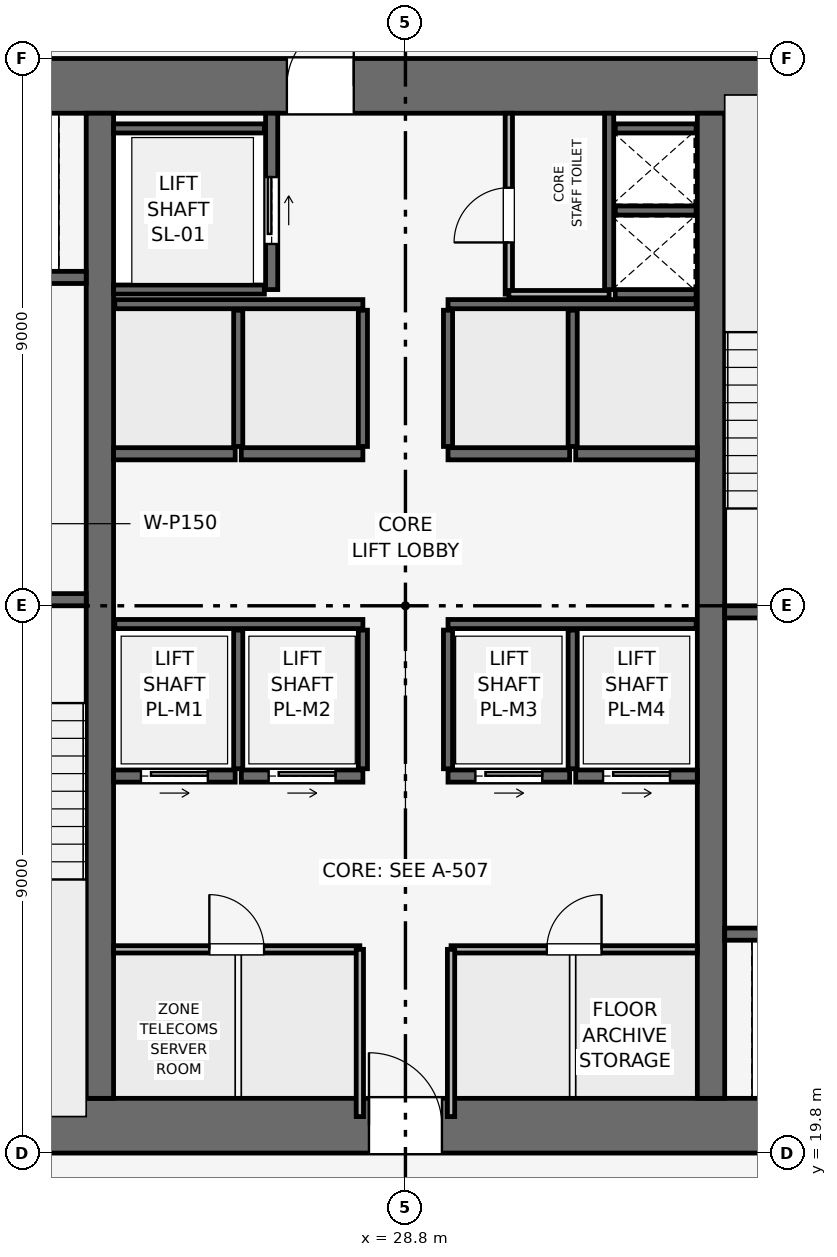
"""IFC4 building model, lengths in metres.
Left out: names, types, materials, properties, quantities, classifications, styles, units other than length and angle.
Written with IfcOpenShell. Run it as: python <this file> out.ifc"""

import sys

from ifc_helpers import new_model, si_unit, direction, frame, frame_2d, origin, place, context, subcontext, project, spatial, rectangle, extrude, element, fill, save


model = new_model("IFC4")
c1 = context("Model", 3, precision=1e-05, world=origin(), true_north=direction((0.0, 1.0)))
c2 = subcontext(c1, "Body", "Model", "MODEL_VIEW")
j1 = project(units=[si_unit("LENGTHUNIT", "METRE"), si_unit("PLANEANGLEUNIT", "RADIAN")], contexts=[c1])
p1 = place(None, origin())
s1 = spatial("IfcSite", under=j1, at=p1, CompositionType="ELEMENT")
p2 = place(p1, origin())
s2 = spatial("IfcBuilding", under=s1, at=p2, CompositionType="ELEMENT")
p3 = place(p2, frame((0.0, 0.0, 160.8)))
s3 = spatial("IfcBuildingStorey", under=s2, at=p3, CompositionType="ELEMENT", Elevation=160.8)
p4 = place(p3, frame((19.8, 20.25, 0.0), z_axis=(0.0, 0.0, 1.0), x_axis=(1.0, 0.0, 0.0)))
e1 = element("IfcWall", 1, at=p4, inside=s3, PredefinedType="SHEAR", context=c2, shape_type="SweptSolid", body=[
    extrude(rectangle(XDim=18.0, YDim=0.9, at=frame_2d((9.0, 0.0))), origin(), (0.0, 0.0, 1.0), 3.75),
])
p5 = place(p4, frame((8.4, 0.0, 0.0)))
e2 = element("IfcOpeningElement", 2, at=p5, cuts=e1, PredefinedType="OPENING", context=c2, shape_type="SweptSolid", body=[
    extrude(rectangle(XDim=1.2, YDim=2.2, at=frame_2d((0.6, 1.1))), frame((0.0, 0.46, 0.0), z_axis=(0.0, -1.0, 0.0), x_axis=(1.0, 0.0, 0.0)), (0.0, 0.0, 1.0), 0.92),
])
p6 = place(p3, frame((19.8, 37.35, 0.0), z_axis=(0.0, 0.0, 1.0), x_axis=(1.0, 0.0, 0.0)))
e3 = element("IfcWall", 3, at=p6, inside=s3, PredefinedType="SHEAR", context=c2, shape_type="SweptSolid", body=[
    extrude(rectangle(XDim=18.0, YDim=0.9, at=frame_2d((9.0, 0.0))), origin(), (0.0, 0.0, 1.0), 3.75),
])
p7 = place(p6, frame((7.05, 0.0, 0.0)))
e4 = element("IfcOpeningElement", 4, at=p7, cuts=e3, PredefinedType="OPENING", context=c2, shape_type="SweptSolid", body=[
    extrude(rectangle(XDim=1.1, YDim=2.15, at=frame_2d((0.55, 1.075))), frame((0.0, 0.46, 0.0), z_axis=(0.0, -1.0, 0.0), x_axis=(1.0, 0.0, 0.0)), (0.0, 0.0, 1.0), 0.92),
])
for number, where, z_axis, x_axis in (
    (5, (23.775, 20.7, 0.0), (0.0, 0.0, 1.0), (0.0, 1.0, 0.0)),
    (6, (33.825, 20.7, 0.0), (0.0, 0.0, 1.0), (0.0, 1.0, 0.0)),
):
    element("IfcWall", number, at=place(p3, frame(where, z_axis=z_axis, x_axis=x_axis)), inside=s3, PredefinedType="SHEAR", context=c2, shape_type="SweptSolid", body=[
        extrude(rectangle(XDim=16.2, YDim=0.45, at=frame_2d((8.1, 0.0))), origin(), (0.0, 0.0, 1.0), 3.75),
    ])
p8 = place(p3, frame((20.4, 28.9, 0.0), z_axis=(0.0, 0.0, 1.0), x_axis=(1.0, 0.0, 0.0)))
e7 = element("IfcWall", 7, at=p8, inside=s3, PredefinedType="SHEAR", context=c2, shape_type="SweptSolid", body=[
    extrude(rectangle(XDim=3.15, YDim=0.2, at=frame_2d((1.575, 0.0))), origin(), (0.0, 0.0, 1.0), 3.495),
])
p9 = place(p8, frame((0.8, 0.0, 0.0)))
e8 = element("IfcOpeningElement", 8, at=p9, cuts=e7, PredefinedType="OPENING", context=c2, shape_type="SweptSolid", body=[
    extrude(rectangle(XDim=1.0, YDim=2.1, at=frame_2d((0.5, 1.05))), frame((0.0, 0.11, 0.0), z_axis=(0.0, -1.0, 0.0), x_axis=(1.0, 0.0, 0.0)), (0.0, 0.0, 1.0), 0.22),
])
p10 = place(p3, frame((34.05, 28.7, 0.0), z_axis=(0.0, 0.0, 1.0), x_axis=(1.0, 0.0, 0.0)))
e9 = element("IfcWall", 9, at=p10, inside=s3, PredefinedType="SHEAR", context=c2, shape_type="SweptSolid", body=[
    extrude(rectangle(XDim=3.15, YDim=0.2, at=frame_2d((1.575, 0.0))), origin(), (0.0, 0.0, 1.0), 3.495),
])
p11 = place(p10, frame((0.8, 0.0, 0.0)))
e10 = element("IfcOpeningElement", 10, at=p11, cuts=e9, PredefinedType="OPENING", context=c2, shape_type="SweptSolid", body=[
    extrude(rectangle(XDim=1.0, YDim=2.1, at=frame_2d((0.5, 1.05))), frame((0.0, 0.11, 0.0), z_axis=(0.0, -1.0, 0.0), x_axis=(1.0, 0.0, 0.0)), (0.0, 0.0, 1.0), 0.22),
])
p12 = place(p3, frame((32.15, 34.0, 0.0), z_axis=(0.0, 0.0, 1.0), x_axis=(0.0, 1.0, 0.0)))
e11 = element("IfcWall", 11, at=p12, inside=s3, PredefinedType="SHEAR", context=c2, shape_type="SweptSolid", body=[
    extrude(rectangle(XDim=2.9, YDim=0.15, at=frame_2d((1.45, 0.0))), origin(), (0.0, 0.0, 1.0), 3.495),
])
for number, where, z_axis, x_axis in (
    (12, (32.25, 33.925, 0.0), (0.0, 0.0, 1.0), (1.0, 0.0, 0.0)),
    (13, (32.25, 35.3, 0.0), (0.0, 0.0, 1.0), (1.0, 0.0, 0.0)),
):
    element("IfcWall", number, at=place(p3, frame(where, z_axis=z_axis, x_axis=x_axis)), inside=s3, PredefinedType="SHEAR", context=c2, shape_type="SweptSolid", body=[
        extrude(rectangle(XDim=1.33, YDim=0.15, at=frame_2d((0.665, 0.0))), origin(), (0.0, 0.0, 1.0), 3.495),
    ])
p13 = place(p3, frame((20.5, 34.2, 0.0), z_axis=(0.0, 0.0, 1.0), x_axis=(1.0, 0.0, 0.0)))
e14 = element("IfcWall", 14, at=p13, inside=s3, PredefinedType="SHEAR", context=c2, shape_type="SweptSolid", body=[
    extrude(rectangle(XDim=3.05, YDim=0.2, at=frame_2d((1.525, 0.0))), origin(), (0.0, 0.0, 1.0), 3.495),
])
p14 = place(p13, frame((0.75, 0.0, 0.0)))
e15 = element("IfcOpeningElement", 15, at=p14, cuts=e14, PredefinedType="OPENING", context=c2, shape_type="SweptSolid", body=[
    extrude(rectangle(XDim=1.1, YDim=2.15, at=frame_2d((0.55, 1.075))), frame((0.0, 0.11, 0.0), z_axis=(0.0, -1.0, 0.0), x_axis=(1.0, 0.0, 0.0)), (0.0, 0.0, 1.0), 0.22),
])
p15 = place(p3, frame((34.05, 23.4, 0.0), z_axis=(0.0, 0.0, 1.0), x_axis=(1.0, 0.0, 0.0)))
e16 = element("IfcWall", 16, at=p15, inside=s3, PredefinedType="SHEAR", context=c2, shape_type="SweptSolid", body=[
    extrude(rectangle(XDim=3.05, YDim=0.2, at=frame_2d((1.525, 0.0))), origin(), (0.0, 0.0, 1.0), 3.495),
])
p16 = place(p15, frame((1.2, 0.0, 0.0)))
e17 = element("IfcOpeningElement", 17, at=p16, cuts=e16, PredefinedType="OPENING", context=c2, shape_type="SweptSolid", body=[
    extrude(rectangle(XDim=1.1, YDim=2.15, at=frame_2d((0.55, 1.075))), frame((0.0, 0.11, 0.0), z_axis=(0.0, -1.0, 0.0), x_axis=(1.0, 0.0, 0.0)), (0.0, 0.0, 1.0), 0.22),
])
p17 = place(p3, frame((26.6, 34.0, 0.0), z_axis=(0.0, 0.0, 1.0), x_axis=(0.0, 1.0, 0.0)))
e18 = element("IfcWall", 18, at=p17, inside=s3, PredefinedType="SHEAR", context=c2, shape_type="SweptSolid", body=[
    extrude(rectangle(XDim=2.9, YDim=0.2, at=frame_2d((1.45, 0.0))), origin(), (0.0, 0.0, 1.0), 3.495),
])
p18 = place(p17, frame((0.75, 0.0, 0.0)))
e19 = element("IfcOpeningElement", 19, at=p18, cuts=e18, PredefinedType="OPENING", context=c2, shape_type="SweptSolid", body=[
    extrude(rectangle(XDim=1.1, YDim=2.15, at=frame_2d((0.55, 1.075))), frame((0.0, 0.11, 0.0), z_axis=(0.0, -1.0, 0.0), x_axis=(1.0, 0.0, 0.0)), (0.0, 0.0, 1.0), 0.22),
])
for number, where, z_axis, x_axis in (
    (20, (24.0, 34.0, 0.0), (0.0, 0.0, 1.0), (1.0, 0.0, 0.0)),
    (21, (24.0, 36.65, 0.0), (0.0, 0.0, 1.0), (1.0, 0.0, 0.0)),
):
    element("IfcWall", number, at=place(p3, frame(where, z_axis=z_axis, x_axis=x_axis)), inside=s3, PredefinedType="SHEAR", context=c2, shape_type="SweptSolid", body=[
        extrude(rectangle(XDim=2.48, YDim=0.15, at=frame_2d((1.24, 0.0))), origin(), (0.0, 0.0, 1.0), 3.495),
    ])
p19 = place(p3, frame((24.0, 26.0, 0.0), z_axis=(0.0, 0.0, 1.0), x_axis=(1.0, 0.0, 0.0)))
e22 = element("IfcWall", 22, at=p19, inside=s3, PredefinedType="SHEAR", context=c2, shape_type="SweptSolid", body=[
    extrude(rectangle(XDim=2.0, YDim=0.2, at=frame_2d((1.0, 0.0))), origin(), (0.0, 0.0, 1.0), 3.495),
])
p20 = place(p19, frame((0.45, 0.0, 0.0)))
e23 = element("IfcOpeningElement", 23, at=p20, cuts=e22, PredefinedType="OPENING", context=c2, shape_type="SweptSolid", body=[
    extrude(rectangle(XDim=1.1, YDim=2.15, at=frame_2d((0.55, 1.075))), frame((0.0, 0.11, 0.0), z_axis=(0.0, -1.0, 0.0), x_axis=(1.0, 0.0, 0.0)), (0.0, 0.0, 1.0), 0.22),
])
p21 = place(p3, frame((26.1, 26.0, 0.0), z_axis=(0.0, 0.0, 1.0), x_axis=(1.0, 0.0, 0.0)))
e24 = element("IfcWall", 24, at=p21, inside=s3, PredefinedType="SHEAR", context=c2, shape_type="SweptSolid", body=[
    extrude(rectangle(XDim=2.0, YDim=0.2, at=frame_2d((1.0, 0.0))), origin(), (0.0, 0.0, 1.0), 3.495),
])
p22 = place(p21, frame((0.45, 0.0, 0.0)))
e25 = element("IfcOpeningElement", 25, at=p22, cuts=e24, PredefinedType="OPENING", context=c2, shape_type="SweptSolid", body=[
    extrude(rectangle(XDim=1.1, YDim=2.15, at=frame_2d((0.55, 1.075))), frame((0.0, 0.11, 0.0), z_axis=(0.0, -1.0, 0.0), x_axis=(1.0, 0.0, 0.0)), (0.0, 0.0, 1.0), 0.22),
])
p23 = place(p3, frame((29.5, 26.0, 0.0), z_axis=(0.0, 0.0, 1.0), x_axis=(1.0, 0.0, 0.0)))
e26 = element("IfcWall", 26, at=p23, inside=s3, PredefinedType="SHEAR", context=c2, shape_type="SweptSolid", body=[
    extrude(rectangle(XDim=2.0, YDim=0.2, at=frame_2d((1.0, 0.0))), origin(), (0.0, 0.0, 1.0), 3.495),
])
p24 = place(p23, frame((0.45, 0.0, 0.0)))
e27 = element("IfcOpeningElement", 27, at=p24, cuts=e26, PredefinedType="OPENING", context=c2, shape_type="SweptSolid", body=[
    extrude(rectangle(XDim=1.1, YDim=2.15, at=frame_2d((0.55, 1.075))), frame((0.0, 0.11, 0.0), z_axis=(0.0, -1.0, 0.0), x_axis=(1.0, 0.0, 0.0)), (0.0, 0.0, 1.0), 0.22),
])
p25 = place(p3, frame((31.6, 26.0, 0.0), z_axis=(0.0, 0.0, 1.0), x_axis=(1.0, 0.0, 0.0)))
e28 = element("IfcWall", 28, at=p25, inside=s3, PredefinedType="SHEAR", context=c2, shape_type="SweptSolid", body=[
    extrude(rectangle(XDim=2.0, YDim=0.2, at=frame_2d((1.0, 0.0))), origin(), (0.0, 0.0, 1.0), 3.495),
])
p26 = place(p25, frame((0.45, 0.0, 0.0)))
e29 = element("IfcOpeningElement", 29, at=p26, cuts=e28, PredefinedType="OPENING", context=c2, shape_type="SweptSolid", body=[
    extrude(rectangle(XDim=1.1, YDim=2.15, at=frame_2d((0.55, 1.075))), frame((0.0, 0.11, 0.0), z_axis=(0.0, -1.0, 0.0), x_axis=(1.0, 0.0, 0.0)), (0.0, 0.0, 1.0), 0.22),
])
for number, where, z_axis, x_axis in (
    (30, (24.0, 31.3, 0.0), (0.0, 0.0, 1.0), (1.0, 0.0, 0.0)),
    (31, (26.1, 31.3, 0.0), (0.0, 0.0, 1.0), (1.0, 0.0, 0.0)),
    (32, (29.5, 31.3, 0.0), (0.0, 0.0, 1.0), (1.0, 0.0, 0.0)),
    (33, (31.6, 31.3, 0.0), (0.0, 0.0, 1.0), (1.0, 0.0, 0.0)),
):
    element("IfcWall", number, at=place(p3, frame(where, z_axis=z_axis, x_axis=x_axis)), inside=s3, PredefinedType="SHEAR", context=c2, shape_type="SweptSolid", body=[
        extrude(rectangle(XDim=2.0, YDim=0.2, at=frame_2d((1.0, 0.0))), origin(), (0.0, 0.0, 1.0), 3.495),
    ])
p27 = place(p3, frame((32.25, 36.65, 0.0), z_axis=(0.0, 0.0, 1.0), x_axis=(1.0, 0.0, 0.0)))
e34 = element("IfcWall", 34, at=p27, inside=s3, PredefinedType="SHEAR", context=c2, shape_type="SweptSolid", body=[
    extrude(rectangle(XDim=1.33, YDim=0.15, at=frame_2d((0.665, 0.0))), origin(), (0.0, 0.0, 1.0), 3.495),
])
for number, where, z_axis, x_axis in (
    (35, (24.02, 28.5, 0.0), (0.0, 0.0, 1.0), (1.0, 0.0, 0.0)),
    (36, (29.5, 28.5, 0.0), (0.0, 0.0, 1.0), (1.0, 0.0, 0.0)),
):
    element("IfcWall", number, at=place(p3, frame(where, z_axis=z_axis, x_axis=x_axis)), inside=s3, PredefinedType="SHEAR", context=c2, shape_type="SweptSolid", body=[
        extrude(rectangle(XDim=4.08, YDim=0.15, at=frame_2d((2.04, 0.0))), origin(), (0.0, 0.0, 1.0), 3.495),
    ])
for number, where, z_axis, x_axis in (
    (37, (26.05, 26.12, 0.0), (0.0, 0.0, 1.0), (0.0, 1.0, 0.0)),
    (38, (28.1, 26.12, 0.0), (0.0, 0.0, 1.0), (0.0, 1.0, 0.0)),
    (39, (29.5, 26.12, 0.0), (0.0, 0.0, 1.0), (0.0, 1.0, 0.0)),
    (40, (31.55, 26.12, 0.0), (0.0, 0.0, 1.0), (0.0, 1.0, 0.0)),
):
    element("IfcWall", number, at=place(p3, frame(where, z_axis=z_axis, x_axis=x_axis)), inside=s3, PredefinedType="SHEAR", context=c2, shape_type="SweptSolid", body=[
        extrude(rectangle(XDim=2.28, YDim=0.15, at=frame_2d((1.14, 0.0))), origin(), (0.0, 0.0, 1.0), 3.495),
    ])
for number, where, z_axis, x_axis in (
    (41, (24.02, 33.76, 0.0), (0.0, 0.0, 1.0), (1.0, 0.0, 0.0)),
    (42, (29.5, 33.76, 0.0), (0.0, 0.0, 1.0), (1.0, 0.0, 0.0)),
):
    element("IfcWall", number, at=place(p3, frame(where, z_axis=z_axis, x_axis=x_axis)), inside=s3, PredefinedType="SHEAR", context=c2, shape_type="SweptSolid", body=[
        extrude(rectangle(XDim=4.08, YDim=0.15, at=frame_2d((2.04, 0.0))), origin(), (0.0, 0.0, 1.0), 3.495),
    ])
for number, where, z_axis, x_axis in (
    (43, (26.05, 31.42, 0.0), (0.0, 0.0, 1.0), (0.0, 1.0, 0.0)),
    (44, (28.1, 31.42, 0.0), (0.0, 0.0, 1.0), (0.0, 1.0, 0.0)),
    (45, (29.5, 31.42, 0.0), (0.0, 0.0, 1.0), (0.0, 1.0, 0.0)),
    (46, (31.55, 31.42, 0.0), (0.0, 0.0, 1.0), (0.0, 1.0, 0.0)),
):
    element("IfcWall", number, at=place(p3, frame(where, z_axis=z_axis, x_axis=x_axis)), inside=s3, PredefinedType="SHEAR", context=c2, shape_type="SweptSolid", body=[
        extrude(rectangle(XDim=2.24, YDim=0.15, at=frame_2d((1.12, 0.0))), origin(), (0.0, 0.0, 1.0), 3.495),
    ])
p28 = place(p3, frame((30.5, 33.925, 0.0), z_axis=(0.0, 0.0, 1.0), x_axis=(0.0, 1.0, 0.0)))
e47 = element("IfcWall", 47, at=p28, inside=s3, PredefinedType="PARTITIONING", context=c2, shape_type="SweptSolid", body=[
    extrude(rectangle(XDim=2.975, YDim=0.12, at=frame_2d((1.487, 0.0))), origin(), (0.0, 0.0, 1.0), 3.495),
])
p29 = place(p28, frame((0.85, 0.0, 0.0)))
e48 = element("IfcOpeningElement", 48, at=p29, cuts=e47, PredefinedType="OPENING", context=c2, shape_type="SweptSolid", body=[
    extrude(rectangle(XDim=0.9, YDim=2.1, at=frame_2d((0.45, 1.05))), frame((0.0, 0.07, 0.0), z_axis=(0.0, -1.0, 0.0), x_axis=(1.0, 0.0, 0.0)), (0.0, 0.0, 1.0), 0.14),
])
p30 = place(p3, frame((30.5, 33.925, 0.0), z_axis=(0.0, 0.0, 1.0), x_axis=(1.0, 0.0, 0.0)))
e49 = element("IfcWall", 49, at=p30, inside=s3, PredefinedType="PARTITIONING", context=c2, shape_type="SweptSolid", body=[
    extrude(rectangle(XDim=1.65, YDim=0.12, at=frame_2d((0.825, 0.0))), origin(), (0.0, 0.0, 1.0), 3.495),
])
p31 = place(p3, frame((24.0, 23.15, 0.0), z_axis=(0.0, 0.0, 1.0), x_axis=(1.0, 0.0, 0.0)))
e50 = element("IfcWall", 50, at=p31, inside=s3, PredefinedType="PARTITIONING", context=c2, shape_type="SweptSolid", body=[
    extrude(rectangle(XDim=4.05, YDim=0.12, at=frame_2d((2.025, 0.0))), origin(), (0.0, 0.0, 1.0), 3.495),
])
p32 = place(p31, frame((1.575, 0.0, 0.0)))
e51 = element("IfcOpeningElement", 51, at=p32, cuts=e50, PredefinedType="OPENING", context=c2, shape_type="SweptSolid", body=[
    extrude(rectangle(XDim=0.9, YDim=2.1, at=frame_2d((0.45, 1.05))), frame((0.0, 0.07, 0.0), z_axis=(0.0, -1.0, 0.0), x_axis=(1.0, 0.0, 0.0)), (0.0, 0.0, 1.0), 0.14),
])
p33 = place(p3, frame((28.05, 20.4, 0.0), z_axis=(0.0, 0.0, 1.0), x_axis=(0.0, 1.0, 0.0)))
e52 = element("IfcWall", 52, at=p33, inside=s3, PredefinedType="PARTITIONING", context=c2, shape_type="SweptSolid", body=[
    extrude(rectangle(XDim=2.75, YDim=0.12, at=frame_2d((1.375, 0.0))), origin(), (0.0, 0.0, 1.0), 3.495),
])
p34 = place(p3, frame((29.55, 23.15, 0.0), z_axis=(0.0, 0.0, 1.0), x_axis=(1.0, 0.0, 0.0)))
e53 = element("IfcWall", 53, at=p34, inside=s3, PredefinedType="PARTITIONING", context=c2, shape_type="SweptSolid", body=[
    extrude(rectangle(XDim=4.05, YDim=0.12, at=frame_2d((2.025, 0.0))), origin(), (0.0, 0.0, 1.0), 3.495),
])
p35 = place(p34, frame((1.575, 0.0, 0.0)))
e54 = element("IfcOpeningElement", 54, at=p35, cuts=e53, PredefinedType="OPENING", context=c2, shape_type="SweptSolid", body=[
    extrude(rectangle(XDim=0.9, YDim=2.1, at=frame_2d((0.45, 1.05))), frame((0.0, 0.07, 0.0), z_axis=(0.0, -1.0, 0.0), x_axis=(1.0, 0.0, 0.0)), (0.0, 0.0, 1.0), 0.14),
])
p36 = place(p3, frame((29.55, 20.4, 0.0), z_axis=(0.0, 0.0, 1.0), x_axis=(0.0, 1.0, 0.0)))
e55 = element("IfcWall", 55, at=p36, inside=s3, PredefinedType="PARTITIONING", context=c2, shape_type="SweptSolid", body=[
    extrude(rectangle(XDim=2.75, YDim=0.12, at=frame_2d((1.375, 0.0))), origin(), (0.0, 0.0, 1.0), 3.495),
])
p37 = place(p18, origin())
e56 = element("IfcDoor", 56, at=p37, inside=s3, OperationType="SLIDING_TO_RIGHT", PredefinedType="DOOR", context=c2, shape_type="SweptSolid", body=[
    extrude(rectangle(XDim=1.1, YDim=2.15, at=frame_2d((0.55, 1.075))), frame((0.0, 0.025, 0.0), z_axis=(0.0, -1.0, 0.0), x_axis=(1.0, 0.0, 0.0)), (0.0, 0.0, 1.0), 0.05),
])
fill(e19, e56)
p38 = place(p20, origin())
e57 = element("IfcDoor", 57, at=p38, inside=s3, OperationType="SLIDING_TO_RIGHT", PredefinedType="DOOR", context=c2, shape_type="SweptSolid", body=[
    extrude(rectangle(XDim=1.1, YDim=2.15, at=frame_2d((0.55, 1.075))), frame((0.0, 0.025, 0.0), z_axis=(0.0, -1.0, 0.0), x_axis=(1.0, 0.0, 0.0)), (0.0, 0.0, 1.0), 0.05),
])
fill(e23, e57)
p39 = place(p22, origin())
e58 = element("IfcDoor", 58, at=p39, inside=s3, OperationType="SLIDING_TO_RIGHT", PredefinedType="DOOR", context=c2, shape_type="SweptSolid", body=[
    extrude(rectangle(XDim=1.1, YDim=2.15, at=frame_2d((0.55, 1.075))), frame((0.0, 0.025, 0.0), z_axis=(0.0, -1.0, 0.0), x_axis=(1.0, 0.0, 0.0)), (0.0, 0.0, 1.0), 0.05),
])
fill(e25, e58)
p40 = place(p24, origin())
e59 = element("IfcDoor", 59, at=p40, inside=s3, OperationType="SLIDING_TO_RIGHT", PredefinedType="DOOR", context=c2, shape_type="SweptSolid", body=[
    extrude(rectangle(XDim=1.1, YDim=2.15, at=frame_2d((0.55, 1.075))), frame((0.0, 0.025, 0.0), z_axis=(0.0, -1.0, 0.0), x_axis=(1.0, 0.0, 0.0)), (0.0, 0.0, 1.0), 0.05),
])
fill(e27, e59)
p41 = place(p26, origin())
e60 = element("IfcDoor", 60, at=p41, inside=s3, OperationType="SLIDING_TO_RIGHT", PredefinedType="DOOR", context=c2, shape_type="SweptSolid", body=[
    extrude(rectangle(XDim=1.1, YDim=2.15, at=frame_2d((0.55, 1.075))), frame((0.0, 0.025, 0.0), z_axis=(0.0, -1.0, 0.0), x_axis=(1.0, 0.0, 0.0)), (0.0, 0.0, 1.0), 0.05),
])
fill(e29, e60)
p42 = place(p29, origin())
e61 = element("IfcDoor", 61, at=p42, inside=s3, OperationType="SINGLE_SWING_LEFT", PredefinedType="DOOR", context=c2, shape_type="SweptSolid", body=[
    extrude(rectangle(XDim=0.9, YDim=2.1, at=frame_2d((0.45, 1.05))), frame((0.0, 0.025, 0.0), z_axis=(0.0, -1.0, 0.0), x_axis=(1.0, 0.0, 0.0)), (0.0, 0.0, 1.0), 0.05),
])
fill(e48, e61)
p43 = place(p32, origin())
e62 = element("IfcDoor", 62, at=p43, inside=s3, OperationType="SINGLE_SWING_LEFT", PredefinedType="DOOR", context=c2, shape_type="SweptSolid", body=[
    extrude(rectangle(XDim=0.9, YDim=2.1, at=frame_2d((0.45, 1.05))), frame((0.0, 0.025, 0.0), z_axis=(0.0, -1.0, 0.0), x_axis=(1.0, 0.0, 0.0)), (0.0, 0.0, 1.0), 0.05),
])
fill(e51, e62)
p44 = place(p35, origin())
e63 = element("IfcDoor", 63, at=p44, inside=s3, OperationType="SINGLE_SWING_RIGHT", PredefinedType="DOOR", context=c2, shape_type="SweptSolid", body=[
    extrude(rectangle(XDim=0.9, YDim=2.1, at=frame_2d((0.45, 1.05))), frame((0.0, 0.025, 0.0), z_axis=(0.0, -1.0, 0.0), x_axis=(1.0, 0.0, 0.0)), (0.0, 0.0, 1.0), 0.05),
])
fill(e54, e63)
p45 = place(p5, origin())
e64 = element("IfcDoor", 64, at=p45, inside=s3, OperationType="SINGLE_SWING_LEFT", PredefinedType="DOOR", context=c2, shape_type="SweptSolid", body=[
    extrude(rectangle(XDim=1.2, YDim=2.2, at=frame_2d((0.6, 1.1))), frame((0.0, 0.025, 0.0), z_axis=(0.0, -1.0, 0.0), x_axis=(1.0, 0.0, 0.0)), (0.0, 0.0, 1.0), 0.05),
])
fill(e2, e64)
p46 = place(p7, origin())
e65 = element("IfcDoor", 65, at=p46, inside=s3, OperationType="SINGLE_SWING_RIGHT", PredefinedType="DOOR", context=c2, shape_type="SweptSolid", body=[
    extrude(rectangle(XDim=1.1, YDim=2.15, at=frame_2d((0.55, 1.075))), frame((0.0, 0.025, 0.0), z_axis=(0.0, -1.0, 0.0), x_axis=(1.0, 0.0, 0.0)), (0.0, 0.0, 1.0), 0.05),
])
fill(e4, e65)
save(model, sys.argv[1])
